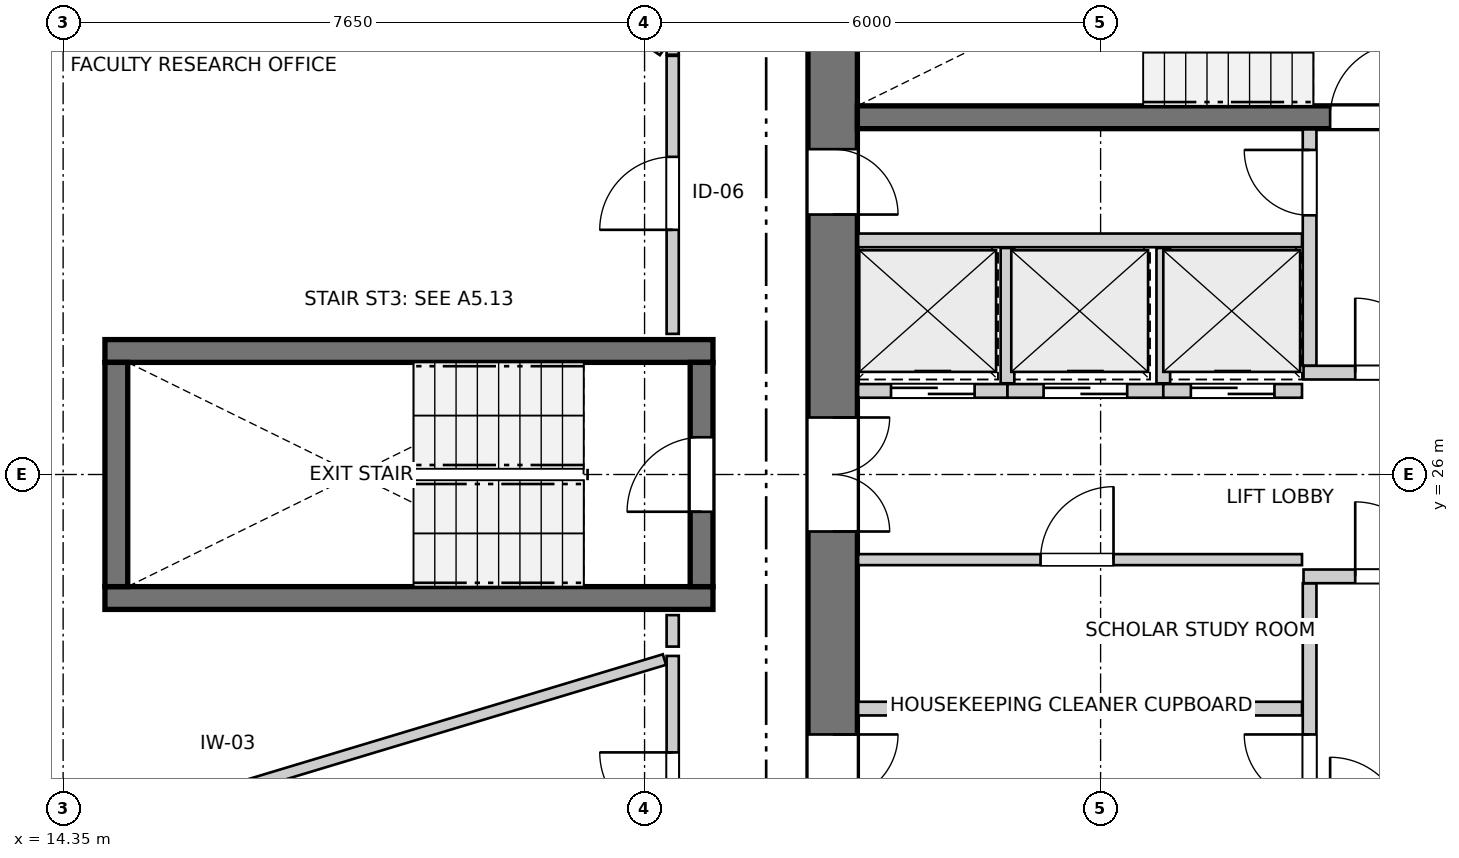
"""IFC4 building model, lengths in metres.
Left out: names, types, materials, properties, quantities, classifications, styles, units other than length and angle.
Written with IfcOpenShell. Run it as: python <this file> out.ifc"""

import sys

from ifc_helpers import new_model, si_unit, direction, frame, frame_2d, origin, place, context, subcontext, project, spatial, rectangle, extrude, source, transform, mapped, element, fill, save


model = new_model("IFC4")
c1 = context("Model", 3, precision=1e-05, world=origin(), true_north=direction((0.0, 1.0)))
c2 = subcontext(c1, "Body", "Model", "MODEL_VIEW")
j1 = project(units=[si_unit("LENGTHUNIT", "METRE"), si_unit("PLANEANGLEUNIT", "RADIAN")], contexts=[c1])
p1 = place(None, origin())
s1 = spatial("IfcSite", under=j1, at=p1, CompositionType="ELEMENT")
p2 = place(p1, origin())
s2 = spatial("IfcBuilding", under=s1, at=p2, CompositionType="ELEMENT")
p3 = place(p2, frame((0.0, 0.0, 133.0)))
s3 = spatial("IfcBuildingStorey", under=s2, at=p3, CompositionType="ELEMENT", Elevation=133.0)
p4 = place(p3, frame((24.475, 33.8, 0.0), z_axis=(0.0, 0.0, 1.0), x_axis=(0.0, -1.0, 0.0)))
e1 = element("IfcWall", 1, at=p4, inside=s3, PredefinedType="SHEAR", context=c2, shape_type="SweptSolid", body=[
    extrude(rectangle(XDim=15.6, YDim=0.65, at=frame_2d((7.8, 0.0))), origin(), (0.0, 0.0, 1.0), 2.95),
])
p5 = place(p4, frame((7.05, 0.0, 0.0)))
e2 = element("IfcOpeningElement", 2, at=p5, cuts=e1, PredefinedType="OPENING", context=c2, shape_type="SweptSolid", body=[
    extrude(rectangle(XDim=1.5, YDim=2.15, at=frame_2d((0.75, 1.075))), frame((0.0, 0.335, 0.0), z_axis=(0.0, -1.0, 0.0), x_axis=(1.0, 0.0, 0.0)), (0.0, 0.0, 1.0), 0.67),
])
p6 = place(p4, frame((3.52, 0.0, 0.0)))
e3 = element("IfcOpeningElement", 3, at=p6, cuts=e1, PredefinedType="OPENING", context=c2, shape_type="SweptSolid", body=[
    extrude(rectangle(XDim=0.86, YDim=2.05, at=frame_2d((0.43, 1.025))), frame((0.0, 0.335, 0.0), z_axis=(0.0, -1.0, 0.0), x_axis=(1.0, 0.0, 0.0)), (0.0, 0.0, 1.0), 0.67),
])
p7 = place(p4, frame((11.22, 0.0, 0.0)))
e4 = element("IfcOpeningElement", 4, at=p7, cuts=e1, PredefinedType="OPENING", context=c2, shape_type="SweptSolid", body=[
    extrude(rectangle(XDim=0.86, YDim=2.05, at=frame_2d((0.43, 1.025))), frame((0.0, 0.335, 0.0), z_axis=(0.0, -1.0, 0.0), x_axis=(1.0, 0.0, 0.0)), (0.0, 0.0, 1.0), 0.67),
])
p8 = place(p3, frame((24.8, 30.7, 0.0), z_axis=(0.0, 0.0, 1.0), x_axis=(1.0, 0.0, 0.0)))
e5 = element("IfcWall", 5, at=p8, inside=s3, PredefinedType="SHEAR", context=c2, shape_type="SweptSolid", body=[
    extrude(rectangle(XDim=11.1, YDim=0.3, at=frame_2d((5.55, 0.0))), origin(), (0.0, 0.0, 1.0), 2.95),
])
p9 = place(p8, frame((6.22, 0.0, 0.0)))
e6 = element("IfcOpeningElement", 6, at=p9, cuts=e5, PredefinedType="OPENING", context=c2, shape_type="SweptSolid", body=[
    extrude(rectangle(XDim=0.98, YDim=2.15, at=frame_2d((0.49, 1.075))), frame((0.0, 0.16, 0.0), z_axis=(0.0, -1.0, 0.0), x_axis=(1.0, 0.0, 0.0)), (0.0, 0.0, 1.0), 0.32),
])
p10 = place(p8, frame((9.15, 0.0, 0.0)))
e7 = element("IfcOpeningElement", 7, at=p10, cuts=e5, PredefinedType="OPENING", context=c2, shape_type="SweptSolid", body=[
    extrude(rectangle(XDim=1.15, YDim=2.15, at=frame_2d((0.575, 1.075))), frame((0.0, 0.16, 0.0), z_axis=(0.0, -1.0, 0.0), x_axis=(1.0, 0.0, 0.0)), (0.0, 0.0, 1.0), 0.32),
])
for number, where, z_axis, x_axis in (
    (8, (14.9, 24.375, 0.0), (0.0, 0.0, 1.0), (1.0, 0.0, 0.0)),
    (9, (22.9, 27.625, 0.0), (0.0, 0.0, 1.0), (-1.0, 0.0, 0.0)),
):
    element("IfcWall", number, at=place(p3, frame(where, z_axis=z_axis, x_axis=x_axis)), inside=s3, PredefinedType="SHEAR", context=c2, shape_type="SweptSolid", body=[
        extrude(rectangle(XDim=8.0, YDim=0.3, at=frame_2d((4.0, 0.0))), origin(), (0.0, 0.0, 1.0), 2.95),
    ])
p11 = place(p3, frame((15.05, 27.475, 0.0), z_axis=(0.0, 0.0, 1.0), x_axis=(0.0, -1.0, 0.0)))
e10 = element("IfcWall", 10, at=p11, inside=s3, PredefinedType="SHEAR", context=c2, shape_type="SweptSolid", body=[
    extrude(rectangle(XDim=2.95, YDim=0.3, at=frame_2d((1.475, 0.0))), origin(), (0.0, 0.0, 1.0), 2.95),
])
p12 = place(p3, frame((22.75, 24.525, 0.0), z_axis=(0.0, 0.0, 1.0), x_axis=(0.0, 1.0, 0.0)))
e11 = element("IfcWall", 11, at=p12, inside=s3, PredefinedType="SHEAR", context=c2, shape_type="SweptSolid", body=[
    extrude(rectangle(XDim=2.95, YDim=0.3, at=frame_2d((1.475, 0.0))), origin(), (0.0, 0.0, 1.0), 2.95),
])
p13 = place(p12, frame((0.985, 0.0, 0.0)))
e12 = element("IfcOpeningElement", 12, at=p13, cuts=e11, PredefinedType="OPENING", context=c2, shape_type="SweptSolid", body=[
    extrude(rectangle(XDim=0.98, YDim=2.15, at=frame_2d((0.49, 1.075))), frame((0.0, 0.16, 0.0), z_axis=(0.0, -1.0, 0.0), x_axis=(1.0, 0.0, 0.0)), (0.0, 0.0, 1.0), 0.32),
])
p14 = place(p3, frame((30.75, 21.46, 0.0), z_axis=(0.0, 0.0, 1.0), x_axis=(0.0, 1.0, 0.0)))
e13 = element("IfcWall", 13, at=p14, inside=s3, PredefinedType="PARTITIONING", context=c2, shape_type="SweptSolid", body=[
    extrude(rectangle(XDim=3.11, YDim=0.18, at=frame_2d((1.555, 0.0))), origin(), (0.0, 0.0, 1.0), 2.95),
])
p15 = place(p14, frame((0.26, 0.0, 0.0)))
e14 = element("IfcOpeningElement", 14, at=p15, cuts=e13, PredefinedType="OPENING", context=c2, shape_type="SweptSolid", body=[
    extrude(rectangle(XDim=0.86, YDim=2.05, at=frame_2d((0.43, 1.025))), frame((0.0, 0.1, 0.0), z_axis=(0.0, -1.0, 0.0), x_axis=(1.0, 0.0, 0.0)), (0.0, 0.0, 1.0), 0.2),
])
p16 = place(p3, frame((30.67, 24.66, 0.0), z_axis=(0.0, 0.0, 1.0), x_axis=(1.0, 0.0, 0.0)))
e15 = element("IfcWall", 15, at=p16, inside=s3, PredefinedType="PARTITIONING", context=c2, shape_type="SweptSolid", body=[
    extrude(rectangle(XDim=5.22, YDim=0.18, at=frame_2d((2.61, 0.0))), origin(), (0.0, 0.0, 1.0), 2.95),
])
p17 = place(p16, frame((0.68, 0.0, 0.0)))
e16 = element("IfcOpeningElement", 16, at=p17, cuts=e15, PredefinedType="OPENING", context=c2, shape_type="SweptSolid", body=[
    extrude(rectangle(XDim=0.98, YDim=2.15, at=frame_2d((0.49, 1.075))), frame((0.0, 0.1, 0.0), z_axis=(0.0, -1.0, 0.0), x_axis=(1.0, 0.0, 0.0)), (0.0, 0.0, 1.0), 0.2),
])
p18 = place(p3, frame((30.75, 27.43, 0.0), z_axis=(0.0, 0.0, 1.0), x_axis=(0.0, 1.0, 0.0)))
e17 = element("IfcWall", 17, at=p18, inside=s3, PredefinedType="PARTITIONING", context=c2, shape_type="SweptSolid", body=[
    extrude(rectangle(XDim=3.11, YDim=0.18, at=frame_2d((1.555, 0.0))), origin(), (0.0, 0.0, 1.0), 2.95),
])
p19 = place(p18, frame((1.98, 0.0, 0.0)))
e18 = element("IfcOpeningElement", 18, at=p19, cuts=e17, PredefinedType="OPENING", context=c2, shape_type="SweptSolid", body=[
    extrude(rectangle(XDim=0.86, YDim=2.05, at=frame_2d((0.43, 1.025))), frame((0.0, 0.1, 0.0), z_axis=(0.0, -1.0, 0.0), x_axis=(1.0, 0.0, 0.0)), (0.0, 0.0, 1.0), 0.2),
])
p20 = place(p3, frame((30.67, 27.34, 0.0), z_axis=(0.0, 0.0, 1.0), x_axis=(1.0, 0.0, 0.0)))
e19 = element("IfcWall", 19, at=p20, inside=s3, PredefinedType="PARTITIONING", context=c2, shape_type="SweptSolid", body=[
    extrude(rectangle(XDim=5.22, YDim=0.18, at=frame_2d((2.61, 0.0))), origin(), (0.0, 0.0, 1.0), 2.95),
])
p21 = place(p20, frame((0.68, 0.0, 0.0)))
e20 = element("IfcOpeningElement", 20, at=p21, cuts=e19, PredefinedType="OPENING", context=c2, shape_type="SweptSolid", body=[
    extrude(rectangle(XDim=0.98, YDim=2.15, at=frame_2d((0.49, 1.075))), frame((0.0, 0.1, 0.0), z_axis=(0.0, -1.0, 0.0), x_axis=(1.0, 0.0, 0.0)), (0.0, 0.0, 1.0), 0.2),
])
p22 = place(p3, frame((24.81, 22.92, 0.0), z_axis=(0.0, 0.0, 1.0), x_axis=(1.0, 0.0, 0.0)))
e21 = element("IfcWall", 21, at=p22, inside=s3, PredefinedType="PARTITIONING", context=c2, shape_type="SweptSolid", body=[
    extrude(rectangle(XDim=5.84, YDim=0.18, at=frame_2d((2.92, 0.0))), origin(), (0.0, 0.0, 1.0), 2.95),
])
p23 = place(p3, frame((24.81, 24.88, 0.0), z_axis=(0.0, 0.0, 1.0), x_axis=(1.0, 0.0, 0.0)))
e22 = element("IfcWall", 22, at=p23, inside=s3, PredefinedType="PARTITIONING", context=c2, shape_type="SweptSolid", body=[
    extrude(rectangle(XDim=5.84, YDim=0.145, at=frame_2d((2.92, 0.0))), origin(), (0.0, 0.0, 1.0), 2.95),
])
p24 = place(p23, frame((2.4, 0.0, 0.0)))
e23 = element("IfcOpeningElement", 23, at=p24, cuts=e22, PredefinedType="OPENING", context=c2, shape_type="SweptSolid", body=[
    extrude(rectangle(XDim=0.96, YDim=2.1, at=frame_2d((0.48, 1.05))), frame((0.0, 0.083, 0.0), z_axis=(0.0, -1.0, 0.0), x_axis=(1.0, 0.0, 0.0)), (0.0, 0.0, 1.0), 0.165),
])
p25 = place(p3, frame((24.81, 29.08, 0.0), z_axis=(0.0, 0.0, 1.0), x_axis=(1.0, 0.0, 0.0)))
e24 = element("IfcWall", 24, at=p25, inside=s3, PredefinedType="PARTITIONING", context=c2, shape_type="SweptSolid", body=[
    extrude(rectangle(XDim=5.84, YDim=0.18, at=frame_2d((2.92, 0.0))), origin(), (0.0, 0.0, 1.0), 2.95),
])
p26 = place(p3, frame((24.81, 27.1, 0.0), z_axis=(0.0, 0.0, 1.0), x_axis=(1.0, 0.0, 0.0)))
e25 = element("IfcWall", 25, at=p26, inside=s3, PredefinedType="PARTITIONING", context=c2, shape_type="SweptSolid", body=[
    extrude(rectangle(XDim=1.965, YDim=0.18, at=frame_2d((0.982, 0.0))), origin(), (0.0, 0.0, 1.0), 2.95),
])
p27 = place(p26, frame((0.433, 0.0, 0.0)))
e26 = element("IfcOpeningElement", 26, at=p27, cuts=e25, PredefinedType="OPENING", context=c2, shape_type="SweptSolid", body=[
    extrude(rectangle(XDim=1.1, YDim=2.15, at=frame_2d((0.55, 1.075))), frame((0.0, 0.1, 0.0), z_axis=(0.0, -1.0, 0.0), x_axis=(1.0, 0.0, 0.0)), (0.0, 0.0, 1.0), 0.2),
])
p28 = place(p3, frame((26.775, 27.1, 0.0), z_axis=(0.0, 0.0, 1.0), x_axis=(1.0, 0.0, 0.0)))
e27 = element("IfcWall", 27, at=p28, inside=s3, PredefinedType="PARTITIONING", context=c2, shape_type="SweptSolid", body=[
    extrude(rectangle(XDim=2.05, YDim=0.18, at=frame_2d((1.025, 0.0))), origin(), (0.0, 0.0, 1.0), 2.95),
])
p29 = place(p28, frame((0.475, 0.0, 0.0)))
e28 = element("IfcOpeningElement", 28, at=p29, cuts=e27, PredefinedType="OPENING", context=c2, shape_type="SweptSolid", body=[
    extrude(rectangle(XDim=1.1, YDim=2.15, at=frame_2d((0.55, 1.075))), frame((0.0, 0.1, 0.0), z_axis=(0.0, -1.0, 0.0), x_axis=(1.0, 0.0, 0.0)), (0.0, 0.0, 1.0), 0.2),
])
p30 = place(p3, frame((26.775, 27.2, 0.0), z_axis=(0.0, 0.0, 1.0), x_axis=(0.0, 1.0, 0.0)))
e29 = element("IfcWall", 29, at=p30, inside=s3, PredefinedType="PARTITIONING", context=c2, shape_type="SweptSolid", body=[
    extrude(rectangle(XDim=1.78, YDim=0.18, at=frame_2d((0.89, 0.0))), origin(), (0.0, 0.0, 1.0), 2.95),
])
p31 = place(p3, frame((28.825, 27.1, 0.0), z_axis=(0.0, 0.0, 1.0), x_axis=(1.0, 0.0, 0.0)))
e30 = element("IfcWall", 30, at=p31, inside=s3, PredefinedType="PARTITIONING", context=c2, shape_type="SweptSolid", body=[
    extrude(rectangle(XDim=1.825, YDim=0.18, at=frame_2d((0.913, 0.0))), origin(), (0.0, 0.0, 1.0), 2.95),
])
p32 = place(p31, frame((0.363, 0.0, 0.0)))
e31 = element("IfcOpeningElement", 31, at=p32, cuts=e30, PredefinedType="OPENING", context=c2, shape_type="SweptSolid", body=[
    extrude(rectangle(XDim=1.1, YDim=2.15, at=frame_2d((0.55, 1.075))), frame((0.0, 0.1, 0.0), z_axis=(0.0, -1.0, 0.0), x_axis=(1.0, 0.0, 0.0)), (0.0, 0.0, 1.0), 0.2),
])
p33 = place(p3, frame((28.825, 27.2, 0.0), z_axis=(0.0, 0.0, 1.0), x_axis=(0.0, 1.0, 0.0)))
e32 = element("IfcWall", 32, at=p33, inside=s3, PredefinedType="PARTITIONING", context=c2, shape_type="SweptSolid", body=[
    extrude(rectangle(XDim=1.78, YDim=0.18, at=frame_2d((0.89, 0.0))), origin(), (0.0, 0.0, 1.0), 2.95),
])
p34 = place(p3, frame((22.37, 27.85, 0.0), z_axis=(0.0, 0.0, 1.0), x_axis=(0.0, 1.0, 0.0)))
e33 = element("IfcWall", 33, at=p34, inside=s3, PredefinedType="PARTITIONING", context=c2, shape_type="SweptSolid", body=[
    extrude(rectangle(XDim=3.658, YDim=0.16, at=frame_2d((1.829, 0.0))), origin(), (0.0, 0.0, 1.0), 2.95),
])
p35 = place(p34, frame((1.369, 0.0, 0.0)))
e34 = element("IfcOpeningElement", 34, at=p35, cuts=e33, PredefinedType="OPENING", context=c2, shape_type="SweptSolid", body=[
    extrude(rectangle(XDim=0.96, YDim=2.1, at=frame_2d((0.48, 1.05))), frame((0.0, 0.09, 0.0), z_axis=(0.0, -1.0, 0.0), x_axis=(1.0, 0.0, 0.0)), (0.0, 0.0, 1.0), 0.18),
])
p36 = place(p3, frame((22.37, 20.163, 0.0), z_axis=(0.0, 0.0, 1.0), x_axis=(0.0, 1.0, 0.0)))
e35 = element("IfcWall", 35, at=p36, inside=s3, PredefinedType="PARTITIONING", context=c2, shape_type="SweptSolid", body=[
    extrude(rectangle(XDim=3.45, YDim=0.16, at=frame_2d((1.725, 0.0))), origin(), (0.0, 0.0, 1.0), 2.95),
])
p37 = place(p36, frame((1.221, 0.0, 0.0)))
e36 = element("IfcOpeningElement", 36, at=p37, cuts=e35, PredefinedType="OPENING", context=c2, shape_type="SweptSolid", body=[
    extrude(rectangle(XDim=0.96, YDim=2.1, at=frame_2d((0.48, 1.05))), frame((0.0, 0.09, 0.0), z_axis=(0.0, -1.0, 0.0), x_axis=(1.0, 0.0, 0.0)), (0.0, 0.0, 1.0), 0.18),
])
p38 = place(p3, frame((22.37, 31.523, 0.0), z_axis=(0.0, 0.0, 1.0), x_axis=(0.0, 1.0, 0.0)))
e37 = element("IfcWall", 37, at=p38, inside=s3, PredefinedType="PARTITIONING", context=c2, shape_type="SweptSolid", body=[
    extrude(rectangle(XDim=2.927, YDim=0.16, at=frame_2d((1.463, 0.0))), origin(), (0.0, 0.0, 1.0), 2.95),
])
p39 = place(p38, frame((0.967, 0.0, 0.0)))
e38 = element("IfcOpeningElement", 38, at=p39, cuts=e37, PredefinedType="OPENING", context=c2, shape_type="SweptSolid", body=[
    extrude(rectangle(XDim=0.96, YDim=2.1, at=frame_2d((0.48, 1.05))), frame((0.0, 0.09, 0.0), z_axis=(0.0, -1.0, 0.0), x_axis=(1.0, 0.0, 0.0)), (0.0, 0.0, 1.0), 0.18),
])
p40 = place(p3, frame((11.113, 20.208, 0.0), z_axis=(0.0, 0.0, 1.0), x_axis=(0.957541878855, 0.288294207778, 0.0)))
e39 = element("IfcWall", 39, at=p40, inside=s3, PredefinedType="PARTITIONING", context=c2, shape_type="SweptSolid", body=[
    extrude(rectangle(XDim=11.643, YDim=0.145, at=frame_2d((5.822, 0.0))), origin(), (0.0, 0.0, 1.0), 2.95),
])
p41 = place(p3, frame((15.677, 36.094, 0.0), z_axis=(0.0, 0.0, 1.0), x_axis=(0.823863992983, -0.566787544911, 0.0)))
e40 = element("IfcWall", 40, at=p41, inside=s3, PredefinedType="PARTITIONING", context=c2, shape_type="SweptSolid", body=[
    extrude(rectangle(XDim=7.969, YDim=0.145, at=frame_2d((3.984, 0.0))), origin(), (0.0, 0.0, 1.0), 2.95),
])
p42 = place(p3, frame((22.37, 23.736, 0.0), z_axis=(0.0, 0.0, 1.0), x_axis=(0.0, 1.0, 0.0)))
e41 = element("IfcWall", 41, at=p42, inside=s3, PredefinedType="PARTITIONING", context=c2, shape_type="SweptSolid", body=[
    extrude(rectangle(XDim=0.414, YDim=0.16, at=frame_2d((0.207, 0.0))), origin(), (0.0, 0.0, 1.0), 2.95),
])
m1 = source(origin(), c2, "Body", "SweptSolid", [
    extrude(rectangle(XDim=0.98, YDim=2.15, at=frame_2d((0.49, 1.075))), frame((0.0, 0.025, 0.0), z_axis=(0.0, -1.0, 0.0), x_axis=(1.0, 0.0, 0.0)), (0.0, 0.0, 1.0), 0.05),
])
p43 = place(p9, origin())
e42 = element("IfcDoor", 42, at=p43, inside=s3, OperationType="SINGLE_SWING_RIGHT", PredefinedType="DOOR", context=c2, shape_type="MappedRepresentation", body=[
    mapped(m1, transform((0.0, 0.0, 0.0), x_axis=(1.0, 0.0, 0.0), y_axis=(0.0, 1.0, 0.0), z_axis=(0.0, 0.0, 1.0), scale=1.0)),
])
fill(e6, e42)
p44 = place(p13, origin())
e43 = element("IfcDoor", 43, at=p44, inside=s3, OperationType="SINGLE_SWING_LEFT", PredefinedType="DOOR", context=c2, shape_type="MappedRepresentation", body=[
    mapped(m1, transform((0.0, 0.0, 0.0), x_axis=(1.0, 0.0, 0.0), y_axis=(0.0, 1.0, 0.0), z_axis=(0.0, 0.0, 1.0), scale=1.0)),
])
fill(e12, e43)
m2 = source(origin(), c2, "Body", "SweptSolid", [
    extrude(rectangle(XDim=1.5, YDim=2.15, at=frame_2d((0.75, 1.075))), frame((0.0, 0.025, 0.0), z_axis=(0.0, -1.0, 0.0), x_axis=(1.0, 0.0, 0.0)), (0.0, 0.0, 1.0), 0.05),
])
p45 = place(p5, origin())
e44 = element("IfcDoor", 44, at=p45, inside=s3, OperationType="DOUBLE_DOOR_SINGLE_SWING", PredefinedType="DOOR", context=c2, shape_type="MappedRepresentation", body=[
    mapped(m2, transform((0.0, 0.0, 0.0), x_axis=(1.0, 0.0, 0.0), y_axis=(0.0, 1.0, 0.0), z_axis=(0.0, 0.0, 1.0), scale=1.0)),
])
fill(e2, e44)
m3 = source(origin(), c2, "Body", "SweptSolid", [
    extrude(rectangle(XDim=0.86, YDim=2.05, at=frame_2d((0.43, 1.025))), frame((0.0, 0.025, 0.0), z_axis=(0.0, -1.0, 0.0), x_axis=(1.0, 0.0, 0.0)), (0.0, 0.0, 1.0), 0.05),
])
p46 = place(p6, origin())
e45 = element("IfcDoor", 45, at=p46, inside=s3, OperationType="SINGLE_SWING_RIGHT", PredefinedType="DOOR", context=c2, shape_type="MappedRepresentation", body=[
    mapped(m3, transform((0.0, 0.0, 0.0), x_axis=(1.0, 0.0, 0.0), y_axis=(0.0, 1.0, 0.0), z_axis=(0.0, 0.0, 1.0), scale=1.0)),
])
fill(e3, e45)
p47 = place(p7, origin())
e46 = element("IfcDoor", 46, at=p47, inside=s3, OperationType="SINGLE_SWING_LEFT", PredefinedType="DOOR", context=c2, shape_type="MappedRepresentation", body=[
    mapped(m3, transform((0.0, 0.0, 0.0), x_axis=(1.0, 0.0, 0.0), y_axis=(0.0, 1.0, 0.0), z_axis=(0.0, 0.0, 1.0), scale=1.0)),
])
fill(e4, e46)
p48 = place(p15, origin())
e47 = element("IfcDoor", 47, at=p48, inside=s3, OperationType="SINGLE_SWING_RIGHT", PredefinedType="DOOR", context=c2, shape_type="MappedRepresentation", body=[
    mapped(m3, transform((0.0, 0.0, 0.0), x_axis=(1.0, 0.0, 0.0), y_axis=(0.0, 1.0, 0.0), z_axis=(0.0, 0.0, 1.0), scale=1.0)),
])
fill(e14, e47)
p49 = place(p17, origin())
e48 = element("IfcDoor", 48, at=p49, inside=s3, OperationType="SINGLE_SWING_LEFT", PredefinedType="DOOR", context=c2, shape_type="MappedRepresentation", body=[
    mapped(m1, transform((0.0, 0.0, 0.0), x_axis=(1.0, 0.0, 0.0), y_axis=(0.0, 1.0, 0.0), z_axis=(0.0, 0.0, 1.0), scale=1.0)),
])
fill(e16, e48)
p50 = place(p19, origin())
e49 = element("IfcDoor", 49, at=p50, inside=s3, OperationType="SINGLE_SWING_RIGHT", PredefinedType="DOOR", context=c2, shape_type="MappedRepresentation", body=[
    mapped(m3, transform((0.0, 0.0, 0.0), x_axis=(1.0, 0.0, 0.0), y_axis=(0.0, 1.0, 0.0), z_axis=(0.0, 0.0, 1.0), scale=1.0)),
])
fill(e18, e49)
p51 = place(p21, origin())
e50 = element("IfcDoor", 50, at=p51, inside=s3, OperationType="SINGLE_SWING_LEFT", PredefinedType="DOOR", context=c2, shape_type="MappedRepresentation", body=[
    mapped(m1, transform((0.0, 0.0, 0.0), x_axis=(1.0, 0.0, 0.0), y_axis=(0.0, 1.0, 0.0), z_axis=(0.0, 0.0, 1.0), scale=1.0)),
])
fill(e20, e50)
m4 = source(origin(), c2, "Body", "SweptSolid", [
    extrude(rectangle(XDim=0.96, YDim=2.1, at=frame_2d((0.48, 1.05))), frame((0.0, 0.025, 0.0), z_axis=(0.0, -1.0, 0.0), x_axis=(1.0, 0.0, 0.0)), (0.0, 0.0, 1.0), 0.05),
])
p52 = place(p24, origin())
e51 = element("IfcDoor", 51, at=p52, inside=s3, OperationType="SINGLE_SWING_RIGHT", PredefinedType="DOOR", context=c2, shape_type="MappedRepresentation", body=[
    mapped(m4, transform((0.0, 0.0, 0.0), x_axis=(1.0, 0.0, 0.0), y_axis=(0.0, 1.0, 0.0), z_axis=(0.0, 0.0, 1.0), scale=1.0)),
])
fill(e23, e51)
m5 = source(origin(), c2, "Body", "SweptSolid", [
    extrude(rectangle(XDim=1.1, YDim=2.15, at=frame_2d((0.55, 1.075))), frame((0.0, 0.025, 0.0), z_axis=(0.0, -1.0, 0.0), x_axis=(1.0, 0.0, 0.0)), (0.0, 0.0, 1.0), 0.05),
])
p53 = place(p27, origin())
e52 = element("IfcDoor", 52, at=p53, inside=s3, OperationType="DOUBLE_DOOR_SLIDING", PredefinedType="DOOR", context=c2, shape_type="MappedRepresentation", body=[
    mapped(m5, transform((0.0, 0.0, 0.0), x_axis=(1.0, 0.0, 0.0), y_axis=(0.0, 1.0, 0.0), z_axis=(0.0, 0.0, 1.0), scale=1.0)),
])
fill(e26, e52)
p54 = place(p29, origin())
e53 = element("IfcDoor", 53, at=p54, inside=s3, OperationType="DOUBLE_DOOR_SLIDING", PredefinedType="DOOR", context=c2, shape_type="MappedRepresentation", body=[
    mapped(m5, transform((0.0, 0.0, 0.0), x_axis=(1.0, 0.0, 0.0), y_axis=(0.0, 1.0, 0.0), z_axis=(0.0, 0.0, 1.0), scale=1.0)),
])
fill(e28, e53)
p55 = place(p32, origin())
e54 = element("IfcDoor", 54, at=p55, inside=s3, OperationType="DOUBLE_DOOR_SLIDING", PredefinedType="DOOR", context=c2, shape_type="MappedRepresentation", body=[
    mapped(m5, transform((0.0, 0.0, 0.0), x_axis=(1.0, 0.0, 0.0), y_axis=(0.0, 1.0, 0.0), z_axis=(0.0, 0.0, 1.0), scale=1.0)),
])
fill(e31, e54)
p56 = place(p35, origin())
e55 = element("IfcDoor", 55, at=p56, inside=s3, OperationType="SINGLE_SWING_LEFT", PredefinedType="DOOR", context=c2, shape_type="MappedRepresentation", body=[
    mapped(m4, transform((0.0, 0.0, 0.0), x_axis=(1.0, 0.0, 0.0), y_axis=(0.0, 1.0, 0.0), z_axis=(0.0, 0.0, 1.0), scale=1.0)),
])
fill(e34, e55)
p57 = place(p37, origin())
e56 = element("IfcDoor", 56, at=p57, inside=s3, OperationType="SINGLE_SWING_RIGHT", PredefinedType="DOOR", context=c2, shape_type="MappedRepresentation", body=[
    mapped(m4, transform((0.0, 0.0, 0.0), x_axis=(1.0, 0.0, 0.0), y_axis=(0.0, 1.0, 0.0), z_axis=(0.0, 0.0, 1.0), scale=1.0)),
])
fill(e36, e56)
save(model, sys.argv[1])
